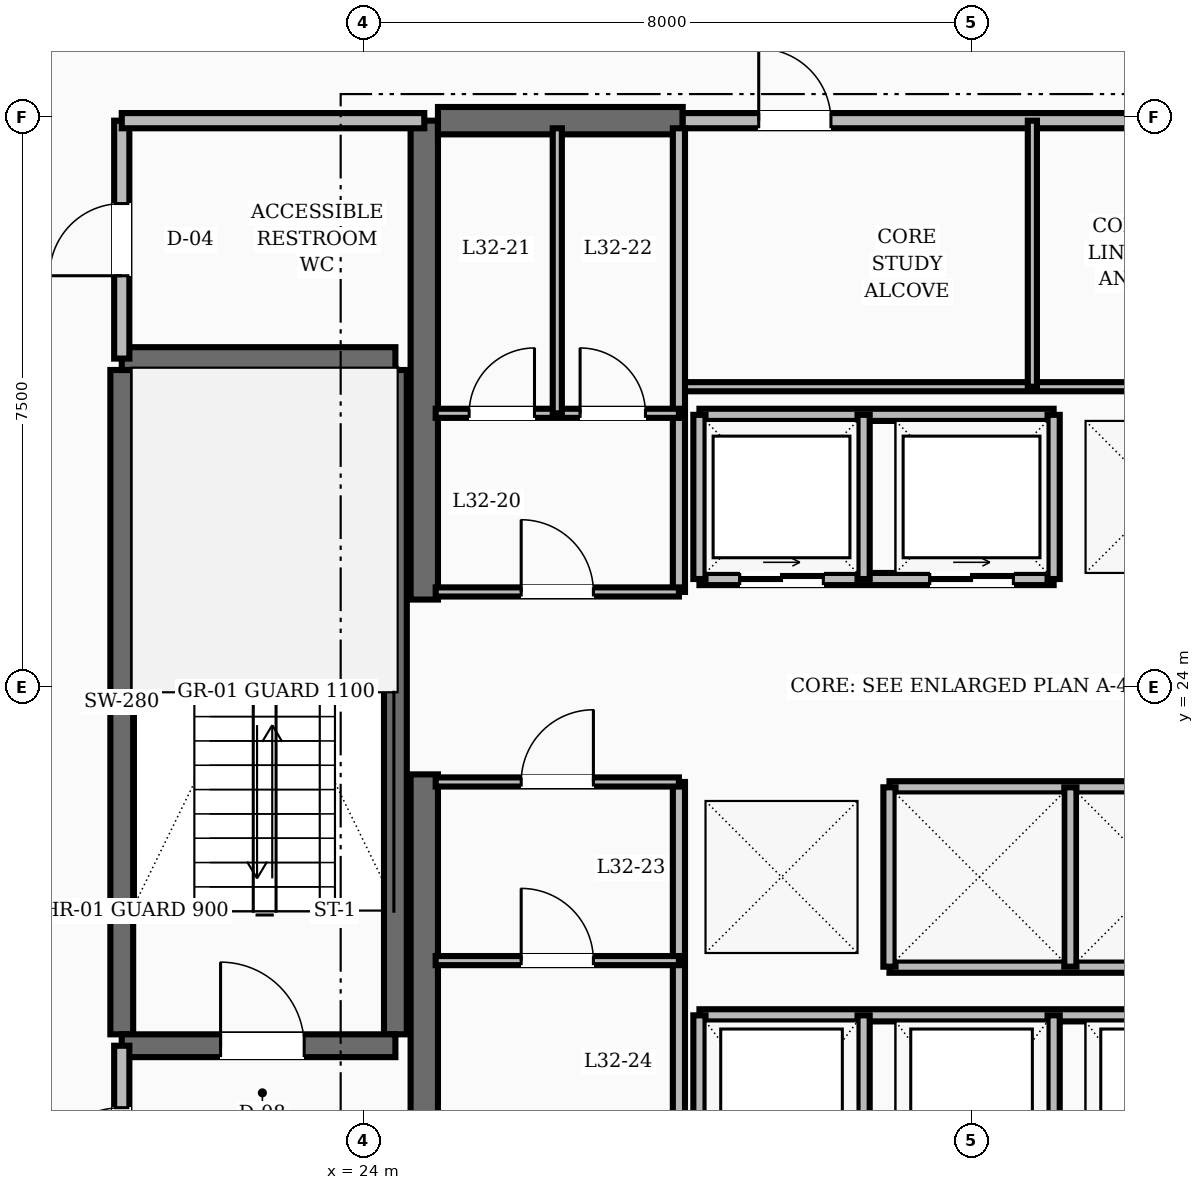
"""IFC4 building model, lengths in metres.
Left out: names, types, materials, properties, quantities, classifications, styles, units other than length and angle.
Written with IfcOpenShell. Run it as: python <this file> out.ifc"""

import sys

from ifc_helpers import new_model, si_unit, direction, frame, frame_2d, origin, place, context, subcontext, project, spatial, rectangle, extrude, element, fill, save


model = new_model("IFC4")
c1 = context("Model", 3, precision=1e-05, world=origin(), true_north=direction((0.0, 1.0)))
c2 = subcontext(c1, "Body", "Model", "MODEL_VIEW")
j1 = project(units=[si_unit("LENGTHUNIT", "METRE"), si_unit("PLANEANGLEUNIT", "RADIAN")], contexts=[c1])
p1 = place(None, origin())
s1 = spatial("IfcSite", under=j1, at=p1, CompositionType="ELEMENT")
p2 = place(p1, origin())
s2 = spatial("IfcBuilding", under=s1, at=p2, CompositionType="ELEMENT")
p3 = place(p2, frame((0.0, 0.0, 128.0)))
s3 = spatial("IfcBuildingStorey", under=s2, at=p3, CompositionType="ELEMENT", Elevation=128.0)
for number, where, z_axis, x_axis in (
    (1, (24.8, 16.55, 0.0), (0.0, 0.0, 1.0), (0.0, 1.0, 0.0)),
    (2, (24.8, 25.15, 0.0), (0.0, 0.0, 1.0), (0.0, 1.0, 0.0)),
):
    element("IfcWall", number, at=place(p3, frame(where, z_axis=z_axis, x_axis=x_axis)), inside=s3, PredefinedType="SHEAR", context=c2, shape_type="SweptSolid", body=[
        extrude(rectangle(XDim=6.3, YDim=0.36, at=frame_2d((3.15, 0.0))), origin(), (0.0, 0.0, 1.0), 3.6),
    ])
p4 = place(p3, frame((24.98, 31.45, 0.0), z_axis=(0.0, 0.0, 1.0), x_axis=(1.0, 0.0, 0.0)))
e3 = element("IfcWall", 3, at=p4, inside=s3, PredefinedType="SHEAR", context=c2, shape_type="SweptSolid", body=[
    extrude(rectangle(XDim=3.22, YDim=0.36, at=frame_2d((1.61, 0.0))), origin(), (0.0, 0.0, 1.0), 3.6),
])
for number, where, z_axis, x_axis in (
    (4, (20.82, 19.43, 0.0), (0.0, 0.0, 1.0), (0.0, 1.0, 0.0)),
    (5, (24.42, 19.43, 0.0), (0.0, 0.0, 1.0), (0.0, 1.0, 0.0)),
):
    element("IfcWall", number, at=place(p3, frame(where, z_axis=z_axis, x_axis=x_axis)), inside=s3, PredefinedType="SHEAR", context=c2, shape_type="SweptSolid", body=[
        extrude(rectangle(XDim=8.74, YDim=0.3, at=frame_2d((4.37, 0.0))), origin(), (0.0, 0.0, 1.0), 3.6),
    ])
p5 = place(p3, frame((20.82, 19.28, 0.0), z_axis=(0.0, 0.0, 1.0), x_axis=(1.0, 0.0, 0.0)))
e6 = element("IfcWall", 6, at=p5, inside=s3, PredefinedType="SHEAR", context=c2, shape_type="SweptSolid", body=[
    extrude(rectangle(XDim=3.6, YDim=0.3, at=frame_2d((1.8, 0.0))), origin(), (0.0, 0.0, 1.0), 3.6),
])
p6 = place(p5, frame((1.3, 0.0, 0.0)))
e7 = element("IfcOpeningElement", 7, at=p6, cuts=e6, PredefinedType="OPENING", context=c2, shape_type="SweptSolid", body=[
    extrude(rectangle(XDim=1.1, YDim=2.1, at=frame_2d((0.55, 1.05))), frame((0.0, 0.16, 0.0), z_axis=(0.0, -1.0, 0.0), x_axis=(1.0, 0.0, 0.0)), (0.0, 0.0, 1.0), 0.32),
])
p7 = place(p3, frame((20.82, 28.32, 0.0), z_axis=(0.0, 0.0, 1.0), x_axis=(1.0, 0.0, 0.0)))
e8 = element("IfcWall", 8, at=p7, inside=s3, PredefinedType="SHEAR", context=c2, shape_type="SweptSolid", body=[
    extrude(rectangle(XDim=3.6, YDim=0.3, at=frame_2d((1.8, 0.0))), origin(), (0.0, 0.0, 1.0), 3.6),
])
p8 = place(p3, frame((20.82, 16.55, 0.0), z_axis=(0.0, 0.0, 1.0), x_axis=(0.0, 1.0, 0.0)))
e9 = element("IfcWall", 9, at=p8, inside=s3, PredefinedType="SOLIDWALL", context=c2, shape_type="SweptSolid", body=[
    extrude(rectangle(XDim=2.73, YDim=0.2, at=frame_2d((1.365, 0.0))), origin(), (0.0, 0.0, 1.0), 2.8),
])
p9 = place(p8, frame((0.815, 0.0, 0.0)))
e10 = element("IfcOpeningElement", 10, at=p9, cuts=e9, PredefinedType="OPENING", context=c2, shape_type="SweptSolid", body=[
    extrude(rectangle(XDim=1.1, YDim=2.1, at=frame_2d((0.55, 1.05))), frame((0.0, 0.11, 0.0), z_axis=(0.0, -1.0, 0.0), x_axis=(1.0, 0.0, 0.0)), (0.0, 0.0, 1.0), 0.22),
])
p10 = place(p3, frame((20.82, 28.32, 0.0), z_axis=(0.0, 0.0, 1.0), x_axis=(0.0, 1.0, 0.0)))
e11 = element("IfcWall", 11, at=p10, inside=s3, PredefinedType="SOLIDWALL", context=c2, shape_type="SweptSolid", body=[
    extrude(rectangle(XDim=3.13, YDim=0.2, at=frame_2d((1.565, 0.0))), origin(), (0.0, 0.0, 1.0), 2.8),
])
p11 = place(p10, frame((1.09, 0.0, 0.0)))
e12 = element("IfcOpeningElement", 12, at=p11, cuts=e11, PredefinedType="OPENING", context=c2, shape_type="SweptSolid", body=[
    extrude(rectangle(XDim=0.95, YDim=2.1, at=frame_2d((0.475, 1.05))), frame((0.0, 0.11, 0.0), z_axis=(0.0, -1.0, 0.0), x_axis=(1.0, 0.0, 0.0)), (0.0, 0.0, 1.0), 0.22),
])
p12 = place(p3, frame((20.82, 31.45, 0.0), z_axis=(0.0, 0.0, 1.0), x_axis=(1.0, 0.0, 0.0)))
e13 = element("IfcWall", 13, at=p12, inside=s3, PredefinedType="SOLIDWALL", context=c2, shape_type="SweptSolid", body=[
    extrude(rectangle(XDim=3.98, YDim=0.2, at=frame_2d((1.99, 0.0))), origin(), (0.0, 0.0, 1.0), 2.8),
])
p13 = place(p3, frame((28.42, 25.42, 0.0), z_axis=(0.0, 0.0, 1.0), x_axis=(1.0, 0.0, 0.0)))
e14 = element("IfcWall", 14, at=p13, inside=s3, PredefinedType="SOLIDWALL", context=c2, shape_type="SweptSolid", body=[
    extrude(rectangle(XDim=4.66, YDim=0.16, at=frame_2d((2.33, 0.0))), origin(), (0.0, 0.0, 1.0), 2.8),
])
p14 = place(p13, frame((0.53, 0.0, 0.0)))
e15 = element("IfcOpeningElement", 15, at=p14, cuts=e14, PredefinedType="OPENING", context=c2, shape_type="SweptSolid", body=[
    extrude(rectangle(XDim=1.1, YDim=2.15, at=frame_2d((0.55, 1.075))), frame((0.0, 0.09, 0.0), z_axis=(0.0, -1.0, 0.0), x_axis=(1.0, 0.0, 0.0)), (0.0, 0.0, 1.0), 0.18),
])
p15 = place(p13, frame((3.03, 0.0, 0.0)))
e16 = element("IfcOpeningElement", 16, at=p15, cuts=e14, PredefinedType="OPENING", context=c2, shape_type="SweptSolid", body=[
    extrude(rectangle(XDim=1.1, YDim=2.15, at=frame_2d((0.55, 1.075))), frame((0.0, 0.09, 0.0), z_axis=(0.0, -1.0, 0.0), x_axis=(1.0, 0.0, 0.0)), (0.0, 0.0, 1.0), 0.18),
])
p16 = place(p3, frame((28.42, 27.58, 0.0), z_axis=(0.0, 0.0, 1.0), x_axis=(1.0, 0.0, 0.0)))
e17 = element("IfcWall", 17, at=p16, inside=s3, PredefinedType="SOLIDWALL", context=c2, shape_type="SweptSolid", body=[
    extrude(rectangle(XDim=4.66, YDim=0.16, at=frame_2d((2.33, 0.0))), origin(), (0.0, 0.0, 1.0), 2.8),
])
for number, where, z_axis, x_axis in (
    (18, (28.42, 25.42, 0.0), (0.0, 0.0, 1.0), (0.0, 1.0, 0.0)),
    (19, (30.58, 25.42, 0.0), (0.0, 0.0, 1.0), (0.0, 1.0, 0.0)),
    (20, (33.08, 25.42, 0.0), (0.0, 0.0, 1.0), (0.0, 1.0, 0.0)),
):
    element("IfcWall", number, at=place(p3, frame(where, z_axis=z_axis, x_axis=x_axis)), inside=s3, PredefinedType="SOLIDWALL", context=c2, shape_type="SweptSolid", body=[
        extrude(rectangle(XDim=2.16, YDim=0.16, at=frame_2d((1.08, 0.0))), origin(), (0.0, 0.0, 1.0), 2.8),
    ])
for number, where, z_axis, x_axis in (
    (21, (30.92, 22.68, 0.0), (0.0, 0.0, 1.0), (1.0, 0.0, 0.0)),
    (22, (30.92, 20.32, 0.0), (0.0, 0.0, 1.0), (1.0, 0.0, 0.0)),
):
    element("IfcWall", number, at=place(p3, frame(where, z_axis=z_axis, x_axis=x_axis)), inside=s3, PredefinedType="SOLIDWALL", context=c2, shape_type="SweptSolid", body=[
        extrude(rectangle(XDim=4.76, YDim=0.16, at=frame_2d((2.38, 0.0))), origin(), (0.0, 0.0, 1.0), 2.8),
    ])
for number, where, z_axis, x_axis in (
    (23, (30.92, 20.32, 0.0), (0.0, 0.0, 1.0), (0.0, 1.0, 0.0)),
    (24, (33.3, 20.32, 0.0), (0.0, 0.0, 1.0), (0.0, 1.0, 0.0)),
):
    element("IfcWall", number, at=place(p3, frame(where, z_axis=z_axis, x_axis=x_axis)), inside=s3, PredefinedType="SOLIDWALL", context=c2, shape_type="SweptSolid", body=[
        extrude(rectangle(XDim=2.36, YDim=0.16, at=frame_2d((1.18, 0.0))), origin(), (0.0, 0.0, 1.0), 2.8),
    ])
p17 = place(p3, frame((28.42, 19.68, 0.0), z_axis=(0.0, 0.0, 1.0), x_axis=(1.0, 0.0, 0.0)))
e25 = element("IfcWall", 25, at=p17, inside=s3, PredefinedType="SOLIDWALL", context=c2, shape_type="SweptSolid", body=[
    extrude(rectangle(XDim=7.16, YDim=0.16, at=frame_2d((3.58, 0.0))), origin(), (0.0, 0.0, 1.0), 2.8),
])
for number, where, z_axis, x_axis in (
    (26, (28.42, 16.92, 0.0), (0.0, 0.0, 1.0), (0.0, 1.0, 0.0)),
    (27, (30.58, 16.92, 0.0), (0.0, 0.0, 1.0), (0.0, 1.0, 0.0)),
    (28, (33.08, 16.92, 0.0), (0.0, 0.0, 1.0), (0.0, 1.0, 0.0)),
):
    element("IfcWall", number, at=place(p3, frame(where, z_axis=z_axis, x_axis=x_axis)), inside=s3, PredefinedType="SOLIDWALL", context=c2, shape_type="SweptSolid", body=[
        extrude(rectangle(XDim=2.76, YDim=0.16, at=frame_2d((1.38, 0.0))), origin(), (0.0, 0.0, 1.0), 2.8),
    ])
p18 = place(p3, frame((28.2, 31.45, 0.0), z_axis=(0.0, 0.0, 1.0), x_axis=(1.0, 0.0, 0.0)))
e29 = element("IfcWall", 29, at=p18, inside=s3, PredefinedType="SOLIDWALL", context=c2, shape_type="SweptSolid", body=[
    extrude(rectangle(XDim=7.6, YDim=0.2, at=frame_2d((3.8, 0.0))), origin(), (0.0, 0.0, 1.0), 2.8),
])
p19 = place(p18, frame((1.0, 0.0, 0.0)))
e30 = element("IfcOpeningElement", 30, at=p19, cuts=e29, PredefinedType="OPENING", context=c2, shape_type="SweptSolid", body=[
    extrude(rectangle(XDim=0.95, YDim=2.1, at=frame_2d((0.475, 1.05))), frame((0.0, 0.11, 0.0), z_axis=(0.0, -1.0, 0.0), x_axis=(1.0, 0.0, 0.0)), (0.0, 0.0, 1.0), 0.22),
])
p20 = place(p3, frame((28.2, 27.95, 0.0), z_axis=(0.0, 0.0, 1.0), x_axis=(1.0, 0.0, 0.0)))
e31 = element("IfcWall", 31, at=p20, inside=s3, PredefinedType="PARTITIONING", context=c2, shape_type="SweptSolid", body=[
    extrude(rectangle(XDim=7.6, YDim=0.12, at=frame_2d((3.8, 0.0))), origin(), (0.0, 0.0, 1.0), 2.8),
])
p21 = place(p3, frame((32.8, 27.95, 0.0), z_axis=(0.0, 0.0, 1.0), x_axis=(0.0, 1.0, 0.0)))
e32 = element("IfcWall", 32, at=p21, inside=s3, PredefinedType="PARTITIONING", context=c2, shape_type="SweptSolid", body=[
    extrude(rectangle(XDim=3.5, YDim=0.12, at=frame_2d((1.75, 0.0))), origin(), (0.0, 0.0, 1.0), 2.8),
])
p22 = place(p3, frame((28.15, 16.7, 0.0), z_axis=(0.0, 0.0, 1.0), x_axis=(0.0, 1.0, 0.0)))
e33 = element("IfcWall", 33, at=p22, inside=s3, PredefinedType="SOLIDWALL", context=c2, shape_type="SweptSolid", body=[
    extrude(rectangle(XDim=6.05, YDim=0.16, at=frame_2d((3.025, 0.0))), origin(), (0.0, 0.0, 1.0), 2.8),
])
p23 = place(p3, frame((28.15, 25.25, 0.0), z_axis=(0.0, 0.0, 1.0), x_axis=(0.0, 1.0, 0.0)))
e34 = element("IfcWall", 34, at=p23, inside=s3, PredefinedType="SOLIDWALL", context=c2, shape_type="SweptSolid", body=[
    extrude(rectangle(XDim=6.1, YDim=0.16, at=frame_2d((3.05, 0.0))), origin(), (0.0, 0.0, 1.0), 2.8),
])
p24 = place(p3, frame((24.95, 25.25, 0.0), z_axis=(0.0, 0.0, 1.0), x_axis=(1.0, 0.0, 0.0)))
e35 = element("IfcWall", 35, at=p24, inside=s3, PredefinedType="PARTITIONING", context=c2, shape_type="SweptSolid", body=[
    extrude(rectangle(XDim=3.2, YDim=0.12, at=frame_2d((1.6, 0.0))), origin(), (0.0, 0.0, 1.0), 2.8),
])
p25 = place(p24, frame((1.125, 0.0, 0.0)))
e36 = element("IfcOpeningElement", 36, at=p25, cuts=e35, PredefinedType="OPENING", context=c2, shape_type="SweptSolid", body=[
    extrude(rectangle(XDim=0.95, YDim=2.1, at=frame_2d((0.475, 1.05))), frame((0.0, 0.07, 0.0), z_axis=(0.0, -1.0, 0.0), x_axis=(1.0, 0.0, 0.0)), (0.0, 0.0, 1.0), 0.14),
])
p26 = place(p3, frame((24.95, 22.75, 0.0), z_axis=(0.0, 0.0, 1.0), x_axis=(1.0, 0.0, 0.0)))
e37 = element("IfcWall", 37, at=p26, inside=s3, PredefinedType="PARTITIONING", context=c2, shape_type="SweptSolid", body=[
    extrude(rectangle(XDim=3.2, YDim=0.12, at=frame_2d((1.6, 0.0))), origin(), (0.0, 0.0, 1.0), 2.8),
])
p27 = place(p26, frame((1.125, 0.0, 0.0)))
e38 = element("IfcOpeningElement", 38, at=p27, cuts=e37, PredefinedType="OPENING", context=c2, shape_type="SweptSolid", body=[
    extrude(rectangle(XDim=0.95, YDim=2.1, at=frame_2d((0.475, 1.05))), frame((0.0, 0.07, 0.0), z_axis=(0.0, -1.0, 0.0), x_axis=(1.0, 0.0, 0.0)), (0.0, 0.0, 1.0), 0.14),
])
p28 = place(p3, frame((24.95, 27.6, 0.0), z_axis=(0.0, 0.0, 1.0), x_axis=(1.0, 0.0, 0.0)))
e39 = element("IfcWall", 39, at=p28, inside=s3, PredefinedType="PARTITIONING", context=c2, shape_type="SweptSolid", body=[
    extrude(rectangle(XDim=3.2, YDim=0.12, at=frame_2d((1.6, 0.0))), origin(), (0.0, 0.0, 1.0), 2.8),
])
p29 = place(p28, frame((0.44, 0.0, 0.0)))
e40 = element("IfcOpeningElement", 40, at=p29, cuts=e39, PredefinedType="OPENING", context=c2, shape_type="SweptSolid", body=[
    extrude(rectangle(XDim=0.86, YDim=2.1, at=frame_2d((0.43, 1.05))), frame((0.0, 0.07, 0.0), z_axis=(0.0, -1.0, 0.0), x_axis=(1.0, 0.0, 0.0)), (0.0, 0.0, 1.0), 0.14),
])
p30 = place(p28, frame((1.9, 0.0, 0.0)))
e41 = element("IfcOpeningElement", 41, at=p30, cuts=e39, PredefinedType="OPENING", context=c2, shape_type="SweptSolid", body=[
    extrude(rectangle(XDim=0.86, YDim=2.1, at=frame_2d((0.43, 1.05))), frame((0.0, 0.07, 0.0), z_axis=(0.0, -1.0, 0.0), x_axis=(1.0, 0.0, 0.0)), (0.0, 0.0, 1.0), 0.14),
])
p31 = place(p3, frame((26.55, 27.6, 0.0), z_axis=(0.0, 0.0, 1.0), x_axis=(0.0, 1.0, 0.0)))
e42 = element("IfcWall", 42, at=p31, inside=s3, PredefinedType="PARTITIONING", context=c2, shape_type="SweptSolid", body=[
    extrude(rectangle(XDim=3.75, YDim=0.12, at=frame_2d((1.875, 0.0))), origin(), (0.0, 0.0, 1.0), 2.8),
])
p32 = place(p3, frame((24.95, 20.4, 0.0), z_axis=(0.0, 0.0, 1.0), x_axis=(1.0, 0.0, 0.0)))
e43 = element("IfcWall", 43, at=p32, inside=s3, PredefinedType="PARTITIONING", context=c2, shape_type="SweptSolid", body=[
    extrude(rectangle(XDim=3.2, YDim=0.12, at=frame_2d((1.6, 0.0))), origin(), (0.0, 0.0, 1.0), 2.8),
])
p33 = place(p32, frame((1.125, 0.0, 0.0)))
e44 = element("IfcOpeningElement", 44, at=p33, cuts=e43, PredefinedType="OPENING", context=c2, shape_type="SweptSolid", body=[
    extrude(rectangle(XDim=0.95, YDim=2.1, at=frame_2d((0.475, 1.05))), frame((0.0, 0.07, 0.0), z_axis=(0.0, -1.0, 0.0), x_axis=(1.0, 0.0, 0.0)), (0.0, 0.0, 1.0), 0.14),
])
p34 = place(p6, origin())
e45 = element("IfcDoor", 45, at=p34, inside=s3, OperationType="SINGLE_SWING_LEFT", PredefinedType="DOOR", context=c2, shape_type="SweptSolid", body=[
    extrude(rectangle(XDim=1.1, YDim=2.1, at=frame_2d((0.55, 1.05))), frame((0.0, 0.025, 0.0), z_axis=(0.0, -1.0, 0.0), x_axis=(1.0, 0.0, 0.0)), (0.0, 0.0, 1.0), 0.05),
])
fill(e7, e45)
p35 = place(p9, origin())
e46 = element("IfcDoor", 46, at=p35, inside=s3, OperationType="SINGLE_SWING_LEFT", PredefinedType="DOOR", context=c2, shape_type="SweptSolid", body=[
    extrude(rectangle(XDim=1.1, YDim=2.1, at=frame_2d((0.55, 1.05))), frame((0.0, 0.025, 0.0), z_axis=(0.0, -1.0, 0.0), x_axis=(1.0, 0.0, 0.0)), (0.0, 0.0, 1.0), 0.05),
])
fill(e10, e46)
p36 = place(p11, origin())
e47 = element("IfcDoor", 47, at=p36, inside=s3, OperationType="SINGLE_SWING_LEFT", PredefinedType="DOOR", context=c2, shape_type="SweptSolid", body=[
    extrude(rectangle(XDim=0.95, YDim=2.1, at=frame_2d((0.475, 1.05))), frame((0.0, 0.025, 0.0), z_axis=(0.0, -1.0, 0.0), x_axis=(1.0, 0.0, 0.0)), (0.0, 0.0, 1.0), 0.05),
])
fill(e12, e47)
p37 = place(p14, origin())
e48 = element("IfcDoor", 48, at=p37, inside=s3, OperationType="SLIDING_TO_RIGHT", PredefinedType="DOOR", context=c2, shape_type="SweptSolid", body=[
    extrude(rectangle(XDim=1.1, YDim=2.15, at=frame_2d((0.55, 1.075))), frame((0.0, 0.025, 0.0), z_axis=(0.0, -1.0, 0.0), x_axis=(1.0, 0.0, 0.0)), (0.0, 0.0, 1.0), 0.05),
])
fill(e15, e48)
p38 = place(p15, origin())
e49 = element("IfcDoor", 49, at=p38, inside=s3, OperationType="SLIDING_TO_RIGHT", PredefinedType="DOOR", context=c2, shape_type="SweptSolid", body=[
    extrude(rectangle(XDim=1.1, YDim=2.15, at=frame_2d((0.55, 1.075))), frame((0.0, 0.025, 0.0), z_axis=(0.0, -1.0, 0.0), x_axis=(1.0, 0.0, 0.0)), (0.0, 0.0, 1.0), 0.05),
])
fill(e16, e49)
p39 = place(p19, origin())
e50 = element("IfcDoor", 50, at=p39, inside=s3, OperationType="SINGLE_SWING_LEFT", PredefinedType="DOOR", context=c2, shape_type="SweptSolid", body=[
    extrude(rectangle(XDim=0.95, YDim=2.1, at=frame_2d((0.475, 1.05))), frame((0.0, 0.025, 0.0), z_axis=(0.0, -1.0, 0.0), x_axis=(1.0, 0.0, 0.0)), (0.0, 0.0, 1.0), 0.05),
])
fill(e30, e50)
p40 = place(p25, origin())
e51 = element("IfcDoor", 51, at=p40, inside=s3, OperationType="SINGLE_SWING_LEFT", PredefinedType="DOOR", context=c2, shape_type="SweptSolid", body=[
    extrude(rectangle(XDim=0.95, YDim=2.1, at=frame_2d((0.475, 1.05))), frame((0.0, 0.025, 0.0), z_axis=(0.0, -1.0, 0.0), x_axis=(1.0, 0.0, 0.0)), (0.0, 0.0, 1.0), 0.05),
])
fill(e36, e51)
p41 = place(p29, origin())
e52 = element("IfcDoor", 52, at=p41, inside=s3, OperationType="SINGLE_SWING_RIGHT", PredefinedType="DOOR", context=c2, shape_type="SweptSolid", body=[
    extrude(rectangle(XDim=0.86, YDim=2.1, at=frame_2d((0.43, 1.05))), frame((0.0, 0.025, 0.0), z_axis=(0.0, -1.0, 0.0), x_axis=(1.0, 0.0, 0.0)), (0.0, 0.0, 1.0), 0.05),
])
fill(e40, e52)
p42 = place(p30, origin())
e53 = element("IfcDoor", 53, at=p42, inside=s3, OperationType="SINGLE_SWING_LEFT", PredefinedType="DOOR", context=c2, shape_type="SweptSolid", body=[
    extrude(rectangle(XDim=0.86, YDim=2.1, at=frame_2d((0.43, 1.05))), frame((0.0, 0.025, 0.0), z_axis=(0.0, -1.0, 0.0), x_axis=(1.0, 0.0, 0.0)), (0.0, 0.0, 1.0), 0.05),
])
fill(e41, e53)
p43 = place(p27, origin())
e54 = element("IfcDoor", 54, at=p43, inside=s3, OperationType="SINGLE_SWING_RIGHT", PredefinedType="DOOR", context=c2, shape_type="SweptSolid", body=[
    extrude(rectangle(XDim=0.95, YDim=2.1, at=frame_2d((0.475, 1.05))), frame((0.0, 0.025, 0.0), z_axis=(0.0, -1.0, 0.0), x_axis=(1.0, 0.0, 0.0)), (0.0, 0.0, 1.0), 0.05),
])
fill(e38, e54)
p44 = place(p33, origin())
e55 = element("IfcDoor", 55, at=p44, inside=s3, OperationType="SINGLE_SWING_LEFT", PredefinedType="DOOR", context=c2, shape_type="SweptSolid", body=[
    extrude(rectangle(XDim=0.95, YDim=2.1, at=frame_2d((0.475, 1.05))), frame((0.0, 0.025, 0.0), z_axis=(0.0, -1.0, 0.0), x_axis=(1.0, 0.0, 0.0)), (0.0, 0.0, 1.0), 0.05),
])
fill(e44, e55)
save(model, sys.argv[1])
